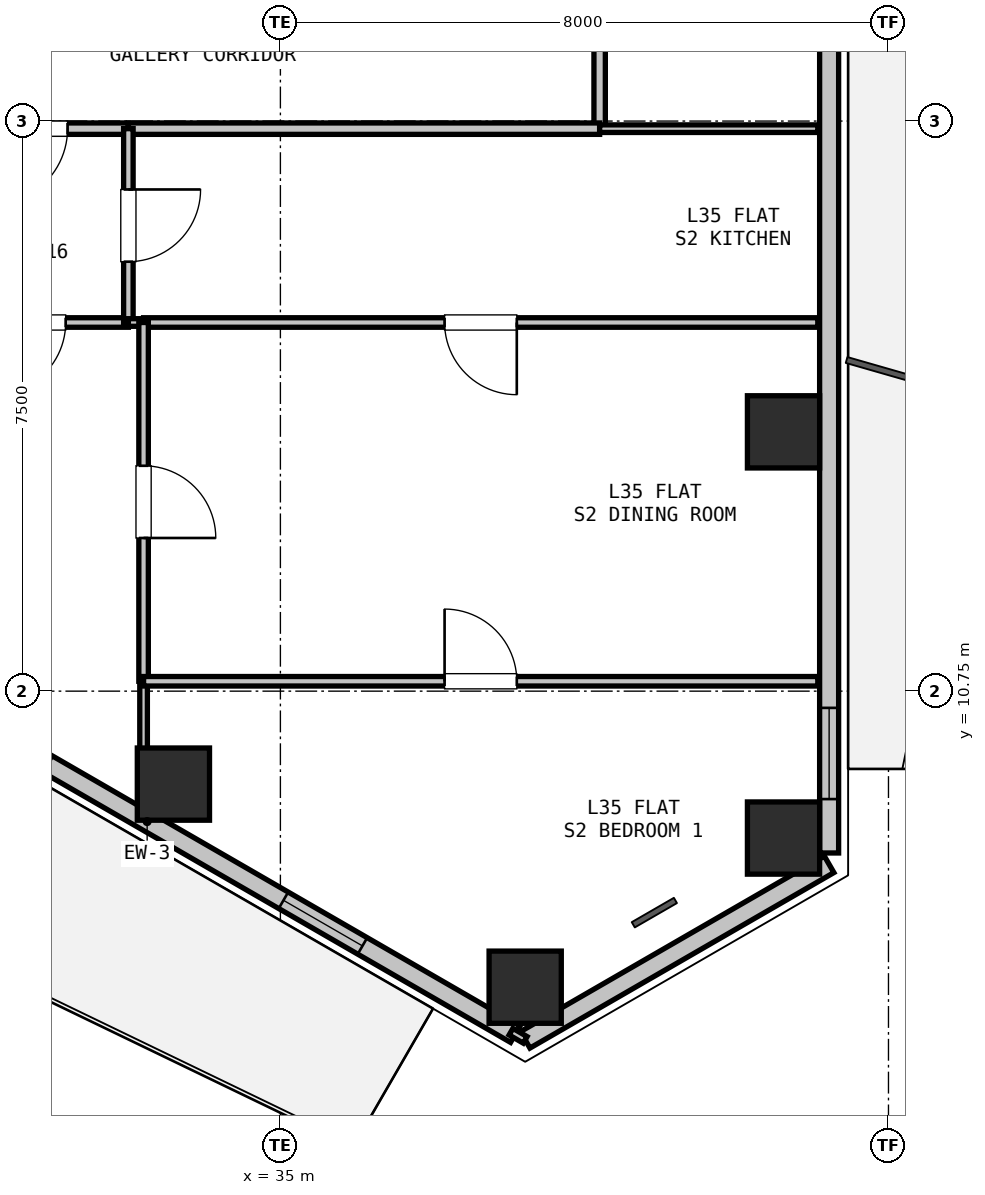
"""IFC4 building model, lengths in metres.
Left out: names, types, materials, properties, quantities, classifications, styles, units other than length and angle.
Written with IfcOpenShell. Run it as: python <this file> out.ifc"""

import sys

from ifc_helpers import new_model, si_unit, direction, frame, frame_2d, origin, origin_2d, place, context, subcontext, project, spatial, rectangle, hollow_rectangle, extrude, element, fill, save


model = new_model("IFC4")
c1 = context("Model", 3, precision=1e-05, world=origin(), true_north=direction((0.0, 1.0)))
c2 = subcontext(c1, "Body", "Model", "MODEL_VIEW")
j1 = project(units=[si_unit("LENGTHUNIT", "METRE"), si_unit("PLANEANGLEUNIT", "RADIAN")], contexts=[c1])
p1 = place(None, origin())
s1 = spatial("IfcSite", under=j1, at=p1, CompositionType="ELEMENT")
p2 = place(p1, origin())
s2 = spatial("IfcBuilding", under=s1, at=p2, CompositionType="ELEMENT")
p3 = place(p2, frame((0.0, 0.0, 127.8)))
s3 = spatial("IfcBuildingStorey", under=s2, at=p3, CompositionType="ELEMENT", Elevation=127.8)
for number, where, z_axis, x_axis in (
    (1, (41.619, 14.161, 0.0), (0.0, 0.0, 1.0), (1.0, 0.0, 0.0)),
    (2, (41.619, 8.817, 0.0), (0.0, 0.0, 1.0), (1.0, 0.0, 0.0)),
    (3, (38.22, 6.855, 0.0), (0.0, 0.0, 1.0), (1.0, 0.0, 0.0)),
    (4, (33.593, 9.527, 0.0), (0.0, 0.0, 1.0), (1.0, 0.0, 0.0)),
):
    element("IfcColumn", number, at=place(p3, frame(where, z_axis=z_axis, x_axis=x_axis)), inside=s3, PredefinedType="COLUMN", context=c2, shape_type="SweptSolid", body=[
        extrude(hollow_rectangle(XDim=0.95, YDim=0.95, WallThickness=0.028, at=origin_2d()), origin(), (0.0, 0.0, 1.0), 3.3),
    ])
p4 = place(p3, frame((42.219, 8.471, 0.0), z_axis=(0.0, 0.0, 1.0), x_axis=(-0.866035021055, -0.499983342029, 0.0)))
e5 = element("IfcWall", 5, at=p4, inside=s3, PredefinedType="SOLIDWALL", context=c2, shape_type="SweptSolid", body=[
    extrude(rectangle(XDim=4.617, YDim=0.25, at=frame_2d((2.309, 0.0))), origin(), (0.0, 0.0, 1.0), 2.68),
])
p5 = place(p3, frame((42.219, 19.807, 0.0), z_axis=(0.0, 0.0, 1.0), x_axis=(0.0, -1.0, 0.0)))
e6 = element("IfcWall", 6, at=p5, inside=s3, PredefinedType="SOLIDWALL", context=c2, shape_type="SweptSolid", body=[
    extrude(rectangle(XDim=11.186, YDim=0.25, at=frame_2d((5.593, 0.0))), origin(), (0.0, 0.0, 1.0), 2.68),
])
p6 = place(p5, frame((9.277, 0.0, 0.9)))
e7 = element("IfcOpeningElement", 7, at=p6, cuts=e6, PredefinedType="OPENING", context=c2, shape_type="SweptSolid", body=[
    extrude(rectangle(XDim=1.2, YDim=1.4, at=frame_2d((0.6, 0.7))), frame((0.0, 0.135, 0.0), z_axis=(0.0, -1.0, 0.0), x_axis=(1.0, 0.0, 0.0)), (0.0, 0.0, 1.0), 0.27),
])
p7 = place(p3, frame((38.091, 6.237, 0.0), z_axis=(0.0, 0.0, 1.0), x_axis=(-0.86602239209, 0.500005216371, 0.0)))
e8 = element("IfcWall", 8, at=p7, inside=s3, PredefinedType="SOLIDWALL", context=c2, shape_type="SweptSolid", body=[
    extrude(rectangle(XDim=11.186, YDim=0.25, at=frame_2d((5.593, 0.0))), origin(), (0.0, 0.0, 1.0), 2.68),
])
p8 = place(p7, frame((7.095, 0.0, 0.0)))
e9 = element("IfcOpeningElement", 9, at=p8, cuts=e8, PredefinedType="OPENING", context=c2, shape_type="SweptSolid", body=[
    extrude(rectangle(XDim=1.1, YDim=2.1, at=frame_2d((0.55, 1.05))), frame((0.0, 0.135, 0.0), z_axis=(0.0, -1.0, 0.0), x_axis=(1.0, 0.0, 0.0)), (0.0, 0.0, 1.0), 0.27),
])
p9 = place(p7, frame((2.322, 0.0, 0.9)))
e10 = element("IfcOpeningElement", 10, at=p9, cuts=e8, PredefinedType="OPENING", context=c2, shape_type="SweptSolid", body=[
    extrude(rectangle(XDim=1.2, YDim=1.4, at=frame_2d((0.6, 0.7))), frame((0.0, 0.135, 0.0), z_axis=(0.0, -1.0, 0.0), x_axis=(1.0, 0.0, 0.0)), (0.0, 0.0, 1.0), 0.27),
])
p10 = place(p3, frame((39.2, 19.9, 0.0), z_axis=(0.0, 0.0, 1.0), x_axis=(0.0, -1.0, 0.0)))
e11 = element("IfcWall", 11, at=p10, inside=s3, PredefinedType="PARTITIONING", context=c2, shape_type="SweptSolid", body=[
    extrude(rectangle(XDim=1.75, YDim=0.15, at=frame_2d((0.875, 0.0))), origin(), (0.0, 0.0, 1.0), 3.06),
])
p11 = place(p3, frame((39.2, 18.15, 0.0), z_axis=(0.0, 0.0, 1.0), x_axis=(-1.0, 0.0, 0.0)))
e12 = element("IfcWall", 12, at=p11, inside=s3, PredefinedType="PARTITIONING", context=c2, shape_type="SweptSolid", body=[
    extrude(rectangle(XDim=6.2, YDim=0.15, at=frame_2d((3.1, 0.0))), origin(), (0.0, 0.0, 1.0), 2.433),
])
p12 = place(p3, frame((33.0, 18.15, 0.0), z_axis=(0.0, 0.0, 1.0), x_axis=(-1.0, 0.0, 0.0)))
e13 = element("IfcWall", 13, at=p12, inside=s3, PredefinedType="PARTITIONING", context=c2, shape_type="SweptSolid", body=[
    extrude(rectangle(XDim=2.6, YDim=0.15, at=frame_2d((1.3, 0.0))), origin(), (0.0, 0.0, 1.0), 3.06),
])
p13 = place(p12, frame((0.8, 0.0, 0.0)))
e14 = element("IfcOpeningElement", 14, at=p13, cuts=e13, PredefinedType="OPENING", context=c2, shape_type="SweptSolid", body=[
    extrude(rectangle(XDim=1.0, YDim=2.15, at=frame_2d((0.5, 1.075))), frame((0.0, 0.085, 0.0), z_axis=(0.0, -1.0, 0.0), x_axis=(1.0, 0.0, 0.0)), (0.0, 0.0, 1.0), 0.17),
])
p14 = place(p3, frame((33.0, 15.6, 0.0), z_axis=(0.0, 0.0, 1.0), x_axis=(-1.0, 0.0, 0.0)))
e15 = element("IfcWall", 15, at=p14, inside=s3, PredefinedType="PARTITIONING", context=c2, shape_type="SweptSolid", body=[
    extrude(rectangle(XDim=2.6, YDim=0.125, at=frame_2d((1.3, 0.0))), origin(), (0.0, 0.0, 1.0), 3.06),
])
p15 = place(p14, frame((0.825, 0.0, 0.0)))
e16 = element("IfcOpeningElement", 16, at=p15, cuts=e15, PredefinedType="OPENING", context=c2, shape_type="SweptSolid", body=[
    extrude(rectangle(XDim=0.95, YDim=2.1, at=frame_2d((0.475, 1.05))), frame((0.0, 0.073, 0.0), z_axis=(0.0, -1.0, 0.0), x_axis=(1.0, 0.0, 0.0)), (0.0, 0.0, 1.0), 0.145),
])
p16 = place(p3, frame((33.0, 18.15, 0.0), z_axis=(0.0, 0.0, 1.0), x_axis=(0.0, -1.0, 0.0)))
e17 = element("IfcWall", 17, at=p16, inside=s3, PredefinedType="PARTITIONING", context=c2, shape_type="SweptSolid", body=[
    extrude(rectangle(XDim=2.55, YDim=0.125, at=frame_2d((1.275, 0.0))), origin(), (0.0, 0.0, 1.0), 3.06),
])
p17 = place(p16, frame((0.8, 0.0, 0.0)))
e18 = element("IfcOpeningElement", 18, at=p17, cuts=e17, PredefinedType="OPENING", context=c2, shape_type="SweptSolid", body=[
    extrude(rectangle(XDim=0.95, YDim=2.1, at=frame_2d((0.475, 1.05))), frame((0.0, 0.073, 0.0), z_axis=(0.0, -1.0, 0.0), x_axis=(1.0, 0.0, 0.0)), (0.0, 0.0, 1.0), 0.145),
])
p18 = place(p3, frame((39.2, 18.15, 0.0), z_axis=(0.0, 0.0, 1.0), x_axis=(1.0, 0.0, 0.0)))
e19 = element("IfcWall", 19, at=p18, inside=s3, PredefinedType="PARTITIONING", context=c2, shape_type="SweptSolid", body=[
    extrude(rectangle(XDim=2.87, YDim=0.1, at=frame_2d((1.435, 0.0))), origin(), (0.0, 0.0, 1.0), 2.365),
])
p19 = place(p3, frame((42.07, 15.6, 0.0), z_axis=(0.0, 0.0, 1.0), x_axis=(-1.0, 0.0, 0.0)))
e20 = element("IfcWall", 20, at=p19, inside=s3, PredefinedType="PARTITIONING", context=c2, shape_type="SweptSolid", body=[
    extrude(rectangle(XDim=8.87, YDim=0.125, at=frame_2d((4.435, 0.0))), origin(), (0.0, 0.0, 1.0), 2.365),
])
p20 = place(p19, frame((3.96, 0.0, 0.0)))
e21 = element("IfcOpeningElement", 21, at=p20, cuts=e20, PredefinedType="OPENING", context=c2, shape_type="SweptSolid", body=[
    extrude(rectangle(XDim=0.95, YDim=2.1, at=frame_2d((0.475, 1.05))), frame((0.0, 0.073, 0.0), z_axis=(0.0, -1.0, 0.0), x_axis=(1.0, 0.0, 0.0)), (0.0, 0.0, 1.0), 0.145),
])
p21 = place(p3, frame((33.2, 15.6, 0.0), z_axis=(0.0, 0.0, 1.0), x_axis=(-1.0, 0.0, 0.0)))
e22 = element("IfcWall", 22, at=p21, inside=s3, PredefinedType="PARTITIONING", context=c2, shape_type="SweptSolid", body=[
    extrude(rectangle(XDim=0.2, YDim=0.1, at=frame_2d((0.1, 0.0))), origin(), (0.0, 0.0, 1.0), 3.06),
])
p22 = place(p3, frame((33.2, 15.6, 0.0), z_axis=(0.0, 0.0, 1.0), x_axis=(0.0, -1.0, 0.0)))
e23 = element("IfcWall", 23, at=p22, inside=s3, PredefinedType="PARTITIONING", context=c2, shape_type="SweptSolid", body=[
    extrude(rectangle(XDim=4.72, YDim=0.125, at=frame_2d((2.36, 0.0))), origin(), (0.0, 0.0, 1.0), 3.06),
])
p23 = place(p22, frame((1.885, 0.0, 0.0)))
e24 = element("IfcOpeningElement", 24, at=p23, cuts=e23, PredefinedType="OPENING", context=c2, shape_type="SweptSolid", body=[
    extrude(rectangle(XDim=0.95, YDim=2.1, at=frame_2d((0.475, 1.05))), frame((0.0, 0.073, 0.0), z_axis=(0.0, -1.0, 0.0), x_axis=(1.0, 0.0, 0.0)), (0.0, 0.0, 1.0), 0.145),
])
p24 = place(p3, frame((33.2, 10.88, 0.0), z_axis=(0.0, 0.0, 1.0), x_axis=(0.0, -1.0, 0.0)))
e25 = element("IfcWall", 25, at=p24, inside=s3, PredefinedType="PARTITIONING", context=c2, shape_type="SweptSolid", body=[
    extrude(rectangle(XDim=1.647, YDim=0.1, at=frame_2d((0.823, 0.0))), origin(), (0.0, 0.0, 1.0), 2.365),
])
p25 = place(p3, frame((33.2, 10.88, 0.0), z_axis=(0.0, 0.0, 1.0), x_axis=(1.0, 0.0, 0.0)))
e26 = element("IfcWall", 26, at=p25, inside=s3, PredefinedType="PARTITIONING", context=c2, shape_type="SweptSolid", body=[
    extrude(rectangle(XDim=8.87, YDim=0.125, at=frame_2d((4.435, 0.0))), origin(), (0.0, 0.0, 1.0), 2.433),
])
p26 = place(p25, frame((3.96, 0.0, 0.0)))
e27 = element("IfcOpeningElement", 27, at=p26, cuts=e26, PredefinedType="OPENING", context=c2, shape_type="SweptSolid", body=[
    extrude(rectangle(XDim=0.95, YDim=2.1, at=frame_2d((0.475, 1.05))), frame((0.0, 0.073, 0.0), z_axis=(0.0, -1.0, 0.0), x_axis=(1.0, 0.0, 0.0)), (0.0, 0.0, 1.0), 0.145),
])
p27 = place(p3, frame((38.221, 6.162, 0.0), z_axis=(0.0, 0.0, 1.0), x_axis=(-0.865581379588, 0.500768285049, 0.0)))
e28 = element("IfcWall", 28, at=p27, inside=s3, PredefinedType="PARTITIONING", context=c2, shape_type="SweptSolid", body=[
    extrude(rectangle(XDim=0.216, YDim=0.1, at=frame_2d((0.108, 0.0))), origin(), (0.0, 0.0, 1.0), 3.06),
])
p28 = place(p6, origin())
e29 = element("IfcWindow", 29, at=p28, inside=s3, PartitioningType="SINGLE_PANEL", PredefinedType="WINDOW", context=c2, shape_type="SweptSolid", body=[
    extrude(rectangle(XDim=1.2, YDim=1.4, at=frame_2d((0.6, 0.7))), frame((0.0, 0.03, 0.0), z_axis=(0.0, -1.0, 0.0), x_axis=(1.0, 0.0, 0.0)), (0.0, 0.0, 1.0), 0.06),
])
fill(e7, e29)
p29 = place(p9, origin())
e30 = element("IfcWindow", 30, at=p29, inside=s3, PartitioningType="SINGLE_PANEL", PredefinedType="WINDOW", context=c2, shape_type="SweptSolid", body=[
    extrude(rectangle(XDim=1.2, YDim=1.4, at=frame_2d((0.6, 0.7))), frame((0.0, 0.03, 0.0), z_axis=(0.0, -1.0, 0.0), x_axis=(1.0, 0.0, 0.0)), (0.0, 0.0, 1.0), 0.06),
])
fill(e10, e30)
p30 = place(p13, origin())
e31 = element("IfcDoor", 31, at=p30, inside=s3, OperationType="SINGLE_SWING_RIGHT", PredefinedType="DOOR", context=c2, shape_type="SweptSolid", body=[
    extrude(rectangle(XDim=1.0, YDim=2.15, at=frame_2d((0.5, 1.075))), frame((0.0, 0.025, 0.0), z_axis=(0.0, -1.0, 0.0), x_axis=(1.0, 0.0, 0.0)), (0.0, 0.0, 1.0), 0.05),
])
fill(e14, e31)
p31 = place(p17, origin())
e32 = element("IfcDoor", 32, at=p31, inside=s3, OperationType="SINGLE_SWING_LEFT", PredefinedType="DOOR", context=c2, shape_type="SweptSolid", body=[
    extrude(rectangle(XDim=0.95, YDim=2.1, at=frame_2d((0.475, 1.05))), frame((0.0, 0.025, 0.0), z_axis=(0.0, -1.0, 0.0), x_axis=(1.0, 0.0, 0.0)), (0.0, 0.0, 1.0), 0.05),
])
fill(e18, e32)
p32 = place(p15, origin())
e33 = element("IfcDoor", 33, at=p32, inside=s3, OperationType="SINGLE_SWING_RIGHT", PredefinedType="DOOR", context=c2, shape_type="SweptSolid", body=[
    extrude(rectangle(XDim=0.95, YDim=2.1, at=frame_2d((0.475, 1.05))), frame((0.0, 0.025, 0.0), z_axis=(0.0, -1.0, 0.0), x_axis=(1.0, 0.0, 0.0)), (0.0, 0.0, 1.0), 0.05),
])
fill(e16, e33)
p33 = place(p20, origin())
e34 = element("IfcDoor", 34, at=p33, inside=s3, OperationType="SINGLE_SWING_LEFT", PredefinedType="DOOR", context=c2, shape_type="SweptSolid", body=[
    extrude(rectangle(XDim=0.95, YDim=2.1, at=frame_2d((0.475, 1.05))), frame((0.0, 0.025, 0.0), z_axis=(0.0, -1.0, 0.0), x_axis=(1.0, 0.0, 0.0)), (0.0, 0.0, 1.0), 0.05),
])
fill(e21, e34)
p34 = place(p23, origin())
e35 = element("IfcDoor", 35, at=p34, inside=s3, OperationType="SINGLE_SWING_RIGHT", PredefinedType="DOOR", context=c2, shape_type="SweptSolid", body=[
    extrude(rectangle(XDim=0.95, YDim=2.1, at=frame_2d((0.475, 1.05))), frame((0.0, 0.025, 0.0), z_axis=(0.0, -1.0, 0.0), x_axis=(1.0, 0.0, 0.0)), (0.0, 0.0, 1.0), 0.05),
])
fill(e24, e35)
p35 = place(p26, origin())
e36 = element("IfcDoor", 36, at=p35, inside=s3, OperationType="SINGLE_SWING_LEFT", PredefinedType="DOOR", context=c2, shape_type="SweptSolid", body=[
    extrude(rectangle(XDim=0.95, YDim=2.1, at=frame_2d((0.475, 1.05))), frame((0.0, 0.025, 0.0), z_axis=(0.0, -1.0, 0.0), x_axis=(1.0, 0.0, 0.0)), (0.0, 0.0, 1.0), 0.05),
])
fill(e27, e36)
save(model, sys.argv[1])
